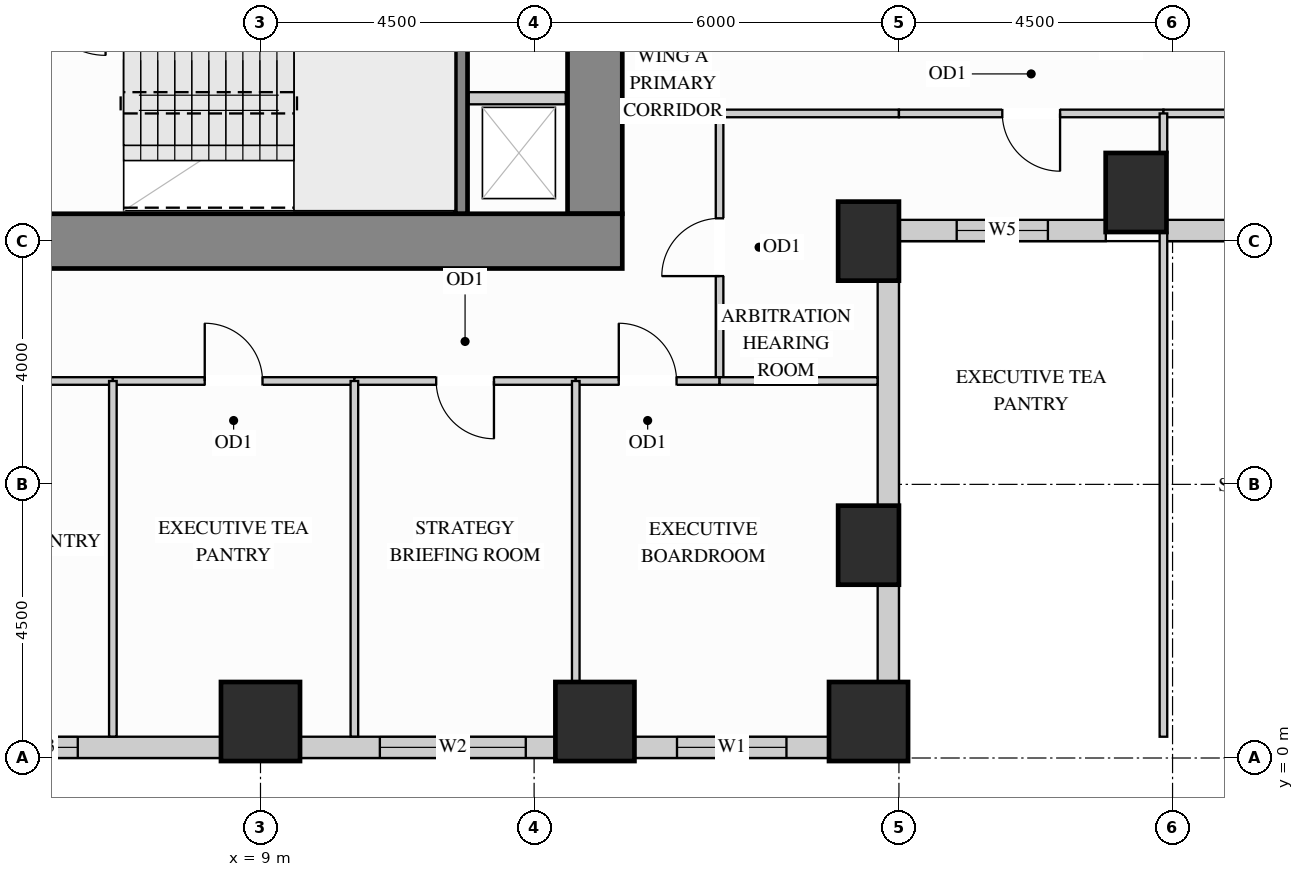
"""IFC4 building model, lengths in metres.
Left out: names, types, materials, properties, quantities, classifications, styles, units other than length and angle.
Written with IfcOpenShell. Run it as: python <this file> out.ifc"""

import sys

from ifc_helpers import new_model, si_unit, direction, frame, frame_2d, origin, origin_2d, place, context, subcontext, project, spatial, rectangle, extrude, source, transform, mapped, element, fill, save


model = new_model("IFC4")
c1 = context("Model", 3, precision=1e-05, world=origin(), true_north=direction((0.0, 1.0)))
c2 = subcontext(c1, "Body", "Model", "MODEL_VIEW")
j1 = project(units=[si_unit("LENGTHUNIT", "METRE"), si_unit("PLANEANGLEUNIT", "RADIAN")], contexts=[c1])
p1 = place(None, origin())
s1 = spatial("IfcSite", under=j1, at=p1, CompositionType="ELEMENT")
p2 = place(p1, origin())
s2 = spatial("IfcBuilding", under=s1, at=p2, CompositionType="ELEMENT")
p3 = place(p2, frame((0.0, 0.0, 51.3)))
s3 = spatial("IfcBuildingStorey", under=s2, at=p3, CompositionType="ELEMENT", Elevation=51.3)
m1 = source(origin(), c2, "Body", "SweptSolid", [
    extrude(rectangle(XDim=1.0, YDim=1.3, at=origin_2d()), origin(), (0.0, 0.0, 1.0), 3.38),
])
for number, where, z_axis, x_axis in (
    (1, (19.0, 3.5, 0.0), (0.0, 0.0, 1.0), (1.0, 0.0, 0.0)),
    (2, (19.0, 8.5, 0.0), (0.0, 0.0, 1.0), (1.0, 0.0, 0.0)),
    (3, (23.4, 9.3, 0.0), (0.0, 0.0, 1.0), (1.0, 0.0, 0.0)),
):
    element("IfcColumn", number, at=place(p3, frame(where, z_axis=z_axis, x_axis=x_axis)), inside=s3, PredefinedType="COLUMN", context=c2, shape_type="MappedRepresentation", body=[
        mapped(m1, transform((0.0, 0.0, 0.0), x_axis=(1.0, 0.0, 0.0), y_axis=(0.0, 1.0, 0.0), z_axis=(0.0, 0.0, 1.0))),
    ])
m2 = source(origin(), c2, "Body", "SweptSolid", [
    extrude(rectangle(XDim=1.3, YDim=1.3, at=origin_2d()), origin(), (0.0, 0.0, 1.0), 3.38),
])
for number, where, z_axis, x_axis in (
    (4, (14.5, 0.6, 0.0), (0.0, 0.0, 1.0), (1.0, 0.0, 0.0)),
    (5, (19.0, 0.6, 0.0), (0.0, 0.0, 1.0), (1.0, 0.0, 0.0)),
    (6, (9.0, 0.6, 0.0), (0.0, 0.0, 1.0), (1.0, 0.0, 0.0)),
):
    element("IfcColumn", number, at=place(p3, frame(where, z_axis=z_axis, x_axis=x_axis)), inside=s3, PredefinedType="COLUMN", context=c2, shape_type="MappedRepresentation", body=[
        mapped(m2, transform((0.0, 0.0, 0.0), x_axis=(1.0, 0.0, 0.0), y_axis=(0.0, 1.0, 0.0), z_axis=(0.0, 0.0, 1.0))),
    ])
m3 = source(origin(), c2, "Body", "SweptSolid", [
    extrude(rectangle(XDim=9.87, YDim=0.9, at=frame_2d((4.935, 0.0))), origin(), (0.0, 0.0, 1.0), 3.38),
])
p4 = place(p3, frame((14.5, 8.95, 0.0), z_axis=(0.0, 0.0, 1.0), x_axis=(0.0, 1.0, 0.0)))
e7 = element("IfcWall", 7, at=p4, inside=s3, PredefinedType="SHEAR", context=c2, shape_type="MappedRepresentation", body=[
    mapped(m3, transform((0.0, 0.0, 0.0), x_axis=(1.0, 0.0, 0.0), y_axis=(0.0, 1.0, 0.0), z_axis=(0.0, 0.0, 1.0))),
])
m4 = source(origin(), c2, "Body", "SweptSolid", [
    extrude(rectangle(XDim=10.9, YDim=0.9, at=frame_2d((5.45, 0.0))), origin(), (0.0, 0.0, 1.0), 3.38),
])
p5 = place(p3, frame((4.05, 8.5, 0.0), z_axis=(0.0, 0.0, 1.0), x_axis=(1.0, 0.0, 0.0)))
e8 = element("IfcWall", 8, at=p5, inside=s3, PredefinedType="SHEAR", context=c2, shape_type="MappedRepresentation", body=[
    mapped(m4, transform((0.0, 0.0, 0.0), x_axis=(1.0, 0.0, 0.0), y_axis=(0.0, 1.0, 0.0), z_axis=(0.0, 0.0, 1.0))),
])
p6 = place(p3, frame((4.148, 0.175, 0.0), z_axis=(0.0, 0.0, 1.0), x_axis=(1.0, 0.0, 0.0)))
e9 = element("IfcWall", 9, at=p6, inside=s3, PredefinedType="SOLIDWALL", context=c2, shape_type="SweptSolid", body=[
    extrude(rectangle(XDim=4.204, YDim=0.35, at=frame_2d((2.102, 0.0))), origin(), (0.0, 0.0, 1.0), 2.51),
])
p7 = place(p6, frame((0.647, 0.0, 0.78)))
e10 = element("IfcOpeningElement", 10, at=p7, cuts=e9, PredefinedType="OPENING", context=c2, shape_type="SweptSolid", body=[
    extrude(rectangle(XDim=1.2, YDim=1.55, at=frame_2d((0.6, 0.775))), frame((0.0, 0.185, 0.0), z_axis=(0.0, -1.0, 0.0), x_axis=(1.0, 0.0, 0.0)), (0.0, 0.0, 1.0), 0.37),
])
p8 = place(p3, frame((9.648, 0.175, 0.0), z_axis=(0.0, 0.0, 1.0), x_axis=(1.0, 0.0, 0.0)))
e11 = element("IfcWall", 11, at=p8, inside=s3, PredefinedType="SOLIDWALL", context=c2, shape_type="SweptSolid", body=[
    extrude(rectangle(XDim=4.204, YDim=0.35, at=frame_2d((2.102, 0.0))), origin(), (0.0, 0.0, 1.0), 2.51),
])
p9 = place(p8, frame((1.315, 0.0, 0.78)))
e12 = element("IfcOpeningElement", 12, at=p9, cuts=e11, PredefinedType="OPENING", context=c2, shape_type="SweptSolid", body=[
    extrude(rectangle(XDim=2.4, YDim=1.55, at=frame_2d((1.2, 0.775))), frame((0.0, 0.185, 0.0), z_axis=(0.0, -1.0, 0.0), x_axis=(1.0, 0.0, 0.0)), (0.0, 0.0, 1.0), 0.37),
])
p10 = place(p3, frame((15.148, 0.175, 0.0), z_axis=(0.0, 0.0, 1.0), x_axis=(1.0, 0.0, 0.0)))
e13 = element("IfcWall", 13, at=p10, inside=s3, PredefinedType="SOLIDWALL", context=c2, shape_type="SweptSolid", body=[
    extrude(rectangle(XDim=3.204, YDim=0.35, at=frame_2d((1.602, 0.0))), origin(), (0.0, 0.0, 1.0), 2.51),
])
p11 = place(p10, frame((0.702, 0.0, 0.78)))
e14 = element("IfcOpeningElement", 14, at=p11, cuts=e13, PredefinedType="OPENING", context=c2, shape_type="SweptSolid", body=[
    extrude(rectangle(XDim=1.8, YDim=1.55, at=frame_2d((0.9, 0.775))), frame((0.0, 0.185, 0.0), z_axis=(0.0, -1.0, 0.0), x_axis=(1.0, 0.0, 0.0)), (0.0, 0.0, 1.0), 0.37),
])
m5 = source(origin(), c2, "Body", "SweptSolid", [
    extrude(rectangle(XDim=1.604, YDim=0.35, at=frame_2d((0.802, 0.0))), origin(), (0.0, 0.0, 1.0), 2.51),
])
p12 = place(p3, frame((19.325, 1.248, 0.0), z_axis=(0.0, 0.0, 1.0), x_axis=(0.0, 1.0, 0.0)))
e15 = element("IfcWall", 15, at=p12, inside=s3, PredefinedType="SOLIDWALL", context=c2, shape_type="MappedRepresentation", body=[
    mapped(m5, transform((0.0, 0.0, 0.0), x_axis=(1.0, 0.0, 0.0), y_axis=(0.0, 1.0, 0.0), z_axis=(0.0, 0.0, 1.0))),
])
m6 = source(origin(), c2, "Body", "SweptSolid", [
    extrude(rectangle(XDim=3.704, YDim=0.35, at=frame_2d((1.852, 0.0))), origin(), (0.0, 0.0, 1.0), 2.51),
])
p13 = place(p3, frame((19.325, 4.148, 0.0), z_axis=(0.0, 0.0, 1.0), x_axis=(0.0, 1.0, 0.0)))
e16 = element("IfcWall", 16, at=p13, inside=s3, PredefinedType="SOLIDWALL", context=c2, shape_type="MappedRepresentation", body=[
    mapped(m6, transform((0.0, 0.0, 0.0), x_axis=(1.0, 0.0, 0.0), y_axis=(0.0, 1.0, 0.0), z_axis=(0.0, 0.0, 1.0))),
])
p14 = place(p3, frame((19.498, 8.675, 0.0), z_axis=(0.0, 0.0, 1.0), x_axis=(1.0, 0.0, 0.0)))
e17 = element("IfcWall", 17, at=p14, inside=s3, PredefinedType="SOLIDWALL", context=c2, shape_type="SweptSolid", body=[
    extrude(rectangle(XDim=3.404, YDim=0.35, at=frame_2d((1.702, 0.0))), origin(), (0.0, 0.0, 1.0), 3.365),
])
p15 = place(p14, frame((0.952, 0.0, 0.78)))
e18 = element("IfcOpeningElement", 18, at=p15, cuts=e17, PredefinedType="OPENING", context=c2, shape_type="SweptSolid", body=[
    extrude(rectangle(XDim=1.5, YDim=2.0, at=frame_2d((0.75, 1.0))), frame((0.0, 0.185, 0.0), z_axis=(0.0, -1.0, 0.0), x_axis=(1.0, 0.0, 0.0)), (0.0, 0.0, 1.0), 0.37),
])
p16 = place(p3, frame((23.898, 8.675, 0.0), z_axis=(0.0, 0.0, 1.0), x_axis=(1.0, 0.0, 0.0)))
e19 = element("IfcWall", 19, at=p16, inside=s3, PredefinedType="SOLIDWALL", context=c2, shape_type="SweptSolid", body=[
    extrude(rectangle(XDim=6.104, YDim=0.35, at=frame_2d((3.052, 0.0))), origin(), (0.0, 0.0, 1.0), 3.365),
])
p17 = place(p16, frame((1.114, 0.0, 0.78)))
e20 = element("IfcOpeningElement", 20, at=p17, cuts=e19, PredefinedType="OPENING", context=c2, shape_type="SweptSolid", body=[
    extrude(rectangle(XDim=1.5, YDim=2.0, at=frame_2d((0.75, 1.0))), frame((0.0, 0.185, 0.0), z_axis=(0.0, -1.0, 0.0), x_axis=(1.0, 0.0, 0.0)), (0.0, 0.0, 1.0), 0.37),
])
p18 = place(p16, frame((3.408, 0.0, 0.78)))
e21 = element("IfcOpeningElement", 21, at=p18, cuts=e19, PredefinedType="OPENING", context=c2, shape_type="SweptSolid", body=[
    extrude(rectangle(XDim=1.5, YDim=2.0, at=frame_2d((0.75, 1.0))), frame((0.0, 0.185, 0.0), z_axis=(0.0, -1.0, 0.0), x_axis=(1.0, 0.0, 0.0)), (0.0, 0.0, 1.0), 0.37),
])
p19 = place(p3, frame((16.55, 6.2, 0.0), z_axis=(0.0, 0.0, 1.0), x_axis=(0.0, 1.0, 0.0)))
e22 = element("IfcWall", 22, at=p19, inside=s3, PredefinedType="PARTITIONING", context=c2, shape_type="SweptSolid", body=[
    extrude(rectangle(XDim=4.4, YDim=0.125, at=frame_2d((2.2, 0.0))), origin(), (0.0, 0.0, 1.0), 3.365),
])
p20 = place(p19, frame((1.725, 0.0, 0.0)))
e23 = element("IfcOpeningElement", 23, at=p20, cuts=e22, PredefinedType="OPENING", context=c2, shape_type="SweptSolid", body=[
    extrude(rectangle(XDim=0.95, YDim=2.15, at=frame_2d((0.475, 1.075))), frame((0.0, 0.073, 0.0), z_axis=(0.0, -1.0, 0.0), x_axis=(1.0, 0.0, 0.0)), (0.0, 0.0, 1.0), 0.145),
])
m7 = source(origin(), c2, "Body", "SweptSolid", [
    extrude(rectangle(XDim=2.95, YDim=0.125, at=frame_2d((1.475, 0.0))), origin(), (0.0, 0.0, 1.0), 3.365),
])
p21 = place(p3, frame((16.55, 10.6, 0.0), z_axis=(0.0, 0.0, 1.0), x_axis=(1.0, 0.0, 0.0)))
e24 = element("IfcWall", 24, at=p21, inside=s3, PredefinedType="PARTITIONING", context=c2, shape_type="MappedRepresentation", body=[
    mapped(m7, transform((0.0, 0.0, 0.0), x_axis=(1.0, 0.0, 0.0), y_axis=(0.0, 1.0, 0.0), z_axis=(0.0, 0.0, 1.0))),
])
p22 = place(p3, frame((19.5, 10.6, 0.0), z_axis=(0.0, 0.0, 1.0), x_axis=(1.0, 0.0, 0.0)))
e25 = element("IfcWall", 25, at=p22, inside=s3, PredefinedType="PARTITIONING", context=c2, shape_type="SweptSolid", body=[
    extrude(rectangle(XDim=4.35, YDim=0.125, at=frame_2d((2.175, 0.0))), origin(), (0.0, 0.0, 1.0), 3.365),
])
p23 = place(p22, frame((1.7, 0.0, 0.0)))
e26 = element("IfcOpeningElement", 26, at=p23, cuts=e25, PredefinedType="OPENING", context=c2, shape_type="SweptSolid", body=[
    extrude(rectangle(XDim=0.95, YDim=2.15, at=frame_2d((0.475, 1.075))), frame((0.0, 0.073, 0.0), z_axis=(0.0, -1.0, 0.0), x_axis=(1.0, 0.0, 0.0)), (0.0, 0.0, 1.0), 0.145),
])
p24 = place(p3, frame((23.85, 10.6, 0.0), z_axis=(0.0, 0.0, 1.0), x_axis=(1.0, 0.0, 0.0)))
e27 = element("IfcWall", 27, at=p24, inside=s3, PredefinedType="PARTITIONING", context=c2, shape_type="SweptSolid", body=[
    extrude(rectangle(XDim=6.0, YDim=0.125, at=frame_2d((3.0, 0.0))), origin(), (0.0, 0.0, 1.0), 3.365),
])
p25 = place(p24, frame((2.525, 0.0, 0.0)))
e28 = element("IfcOpeningElement", 28, at=p25, cuts=e27, PredefinedType="OPENING", context=c2, shape_type="SweptSolid", body=[
    extrude(rectangle(XDim=0.95, YDim=2.15, at=frame_2d((0.475, 1.075))), frame((0.0, 0.073, 0.0), z_axis=(0.0, -1.0, 0.0), x_axis=(1.0, 0.0, 0.0)), (0.0, 0.0, 1.0), 0.145),
])
m8 = source(origin(), c2, "Body", "SweptSolid", [
    extrude(rectangle(XDim=8.29, YDim=0.125, at=frame_2d((4.145, 0.0))), origin(), (0.0, 0.0, 1.0), 3.365),
])
p26 = place(p3, frame((23.85, 0.35, 0.0), z_axis=(0.0, 0.0, 1.0), x_axis=(0.0, 1.0, 0.0)))
e29 = element("IfcWall", 29, at=p26, inside=s3, PredefinedType="PARTITIONING", context=c2, shape_type="MappedRepresentation", body=[
    mapped(m8, transform((0.0, 0.0, 0.0), x_axis=(1.0, 0.0, 0.0), y_axis=(0.0, 1.0, 0.0), z_axis=(0.0, 0.0, 1.0))),
])
m9 = source(origin(), c2, "Body", "SweptSolid", [
    extrude(rectangle(XDim=0.64, YDim=0.125, at=frame_2d((0.32, 0.0))), origin(), (0.0, 0.0, 1.0), 3.365),
])
p27 = place(p3, frame((23.85, 9.96, 0.0), z_axis=(0.0, 0.0, 1.0), x_axis=(0.0, 1.0, 0.0)))
e30 = element("IfcWall", 30, at=p27, inside=s3, PredefinedType="PARTITIONING", context=c2, shape_type="MappedRepresentation", body=[
    mapped(m9, transform((0.0, 0.0, 0.0), x_axis=(1.0, 0.0, 0.0), y_axis=(0.0, 1.0, 0.0), z_axis=(0.0, 0.0, 1.0))),
])
p28 = place(p3, frame((2.45, 6.2, 0.0), z_axis=(0.0, 0.0, 1.0), x_axis=(1.0, 0.0, 0.0)))
e31 = element("IfcWall", 31, at=p28, inside=s3, PredefinedType="PARTITIONING", context=c2, shape_type="SweptSolid", body=[
    extrude(rectangle(XDim=4.122, YDim=0.125, at=frame_2d((2.061, 0.0))), origin(), (0.0, 0.0, 1.0), 2.828),
])
p29 = place(p28, frame((1.586, 0.0, 0.0)))
e32 = element("IfcOpeningElement", 32, at=p29, cuts=e31, PredefinedType="OPENING", context=c2, shape_type="SweptSolid", body=[
    extrude(rectangle(XDim=0.95, YDim=2.15, at=frame_2d((0.475, 1.075))), frame((0.0, 0.073, 0.0), z_axis=(0.0, -1.0, 0.0), x_axis=(1.0, 0.0, 0.0)), (0.0, 0.0, 1.0), 0.145),
])
p30 = place(p3, frame((6.572, 6.2, 0.0), z_axis=(0.0, 0.0, 1.0), x_axis=(1.0, 0.0, 0.0)))
e33 = element("IfcWall", 33, at=p30, inside=s3, PredefinedType="PARTITIONING", context=c2, shape_type="SweptSolid", body=[
    extrude(rectangle(XDim=3.972, YDim=0.125, at=frame_2d((1.986, 0.0))), origin(), (0.0, 0.0, 1.0), 2.828),
])
p31 = place(p30, frame((1.511, 0.0, 0.0)))
e34 = element("IfcOpeningElement", 34, at=p31, cuts=e33, PredefinedType="OPENING", context=c2, shape_type="SweptSolid", body=[
    extrude(rectangle(XDim=0.95, YDim=2.15, at=frame_2d((0.475, 1.075))), frame((0.0, 0.073, 0.0), z_axis=(0.0, -1.0, 0.0), x_axis=(1.0, 0.0, 0.0)), (0.0, 0.0, 1.0), 0.145),
])
p32 = place(p3, frame((10.544, 6.2, 0.0), z_axis=(0.0, 0.0, 1.0), x_axis=(1.0, 0.0, 0.0)))
e35 = element("IfcWall", 35, at=p32, inside=s3, PredefinedType="PARTITIONING", context=c2, shape_type="SweptSolid", body=[
    extrude(rectangle(XDim=3.641, YDim=0.125, at=frame_2d((1.821, 0.0))), origin(), (0.0, 0.0, 1.0), 2.828),
])
p33 = place(p32, frame((1.345, 0.0, 0.0)))
e36 = element("IfcOpeningElement", 36, at=p33, cuts=e35, PredefinedType="OPENING", context=c2, shape_type="SweptSolid", body=[
    extrude(rectangle(XDim=0.95, YDim=2.15, at=frame_2d((0.475, 1.075))), frame((0.0, 0.073, 0.0), z_axis=(0.0, -1.0, 0.0), x_axis=(1.0, 0.0, 0.0)), (0.0, 0.0, 1.0), 0.145),
])
p34 = place(p3, frame((14.185, 6.2, 0.0), z_axis=(0.0, 0.0, 1.0), x_axis=(1.0, 0.0, 0.0)))
e37 = element("IfcWall", 37, at=p34, inside=s3, PredefinedType="PARTITIONING", context=c2, shape_type="SweptSolid", body=[
    extrude(rectangle(XDim=2.365, YDim=0.125, at=frame_2d((1.183, 0.0))), origin(), (0.0, 0.0, 1.0), 2.828),
])
p35 = place(p34, frame((0.708, 0.0, 0.0)))
e38 = element("IfcOpeningElement", 38, at=p35, cuts=e37, PredefinedType="OPENING", context=c2, shape_type="SweptSolid", body=[
    extrude(rectangle(XDim=0.95, YDim=2.15, at=frame_2d((0.475, 1.075))), frame((0.0, 0.073, 0.0), z_axis=(0.0, -1.0, 0.0), x_axis=(1.0, 0.0, 0.0)), (0.0, 0.0, 1.0), 0.145),
])
m10 = source(origin(), c2, "Body", "SweptSolid", [
    extrude(rectangle(XDim=2.598, YDim=0.125, at=frame_2d((1.299, 0.0))), origin(), (0.0, 0.0, 1.0), 2.828),
])
p36 = place(p3, frame((16.55, 6.2, 0.0), z_axis=(0.0, 0.0, 1.0), x_axis=(1.0, 0.0, 0.0)))
e39 = element("IfcWall", 39, at=p36, inside=s3, PredefinedType="PARTITIONING", context=c2, shape_type="MappedRepresentation", body=[
    mapped(m10, transform((0.0, 0.0, 0.0), x_axis=(1.0, 0.0, 0.0), y_axis=(0.0, 1.0, 0.0), z_axis=(0.0, 0.0, 1.0))),
])
m11 = source(origin(), c2, "Body", "SweptSolid", [
    extrude(rectangle(XDim=5.848, YDim=0.125, at=frame_2d((2.924, 0.0))), origin(), (0.0, 0.0, 1.0), 3.365),
])
for number, where, z_axis, x_axis in (
    (40, (6.572, 0.352, 0.0), (0.0, 0.0, 1.0), (0.0, 1.0, 0.0)),
    (41, (10.544, 0.352, 0.0), (0.0, 0.0, 1.0), (0.0, 1.0, 0.0)),
):
    element("IfcWall", number, at=place(p3, frame(where, z_axis=z_axis, x_axis=x_axis)), inside=s3, PredefinedType="PARTITIONING", context=c2, shape_type="MappedRepresentation", body=[
        mapped(m11, transform((0.0, 0.0, 0.0), x_axis=(1.0, 0.0, 0.0), y_axis=(0.0, 1.0, 0.0), z_axis=(0.0, 0.0, 1.0))),
    ])
m12 = source(origin(), c2, "Body", "SweptSolid", [
    extrude(rectangle(XDim=4.94, YDim=0.125, at=frame_2d((2.47, 0.0))), origin(), (0.0, 0.0, 1.0), 3.365),
])
p37 = place(p3, frame((14.185, 1.26, 0.0), z_axis=(0.0, 0.0, 1.0), x_axis=(0.0, 1.0, 0.0)))
e42 = element("IfcWall", 42, at=p37, inside=s3, PredefinedType="PARTITIONING", context=c2, shape_type="MappedRepresentation", body=[
    mapped(m12, transform((0.0, 0.0, 0.0), x_axis=(1.0, 0.0, 0.0), y_axis=(0.0, 1.0, 0.0), z_axis=(0.0, 0.0, 1.0))),
])
m13 = source(origin(), c2, "Body", "SweptSolid", [
    extrude(rectangle(XDim=1.6, YDim=0.2, at=frame_2d((0.8, 0.0))), origin(), (0.0, 0.0, 1.0), 3.365),
])
p38 = place(p3, frame((12.42, 10.85, 0.0), z_axis=(0.0, 0.0, 1.0), x_axis=(1.0, 0.0, 0.0)))
e43 = element("IfcWall", 43, at=p38, inside=s3, PredefinedType="PARTITIONING", context=c2, shape_type="MappedRepresentation", body=[
    mapped(m13, transform((0.0, 0.0, 0.0), x_axis=(1.0, 0.0, 0.0), y_axis=(0.0, 1.0, 0.0), z_axis=(0.0, 0.0, 1.0))),
])
m14 = source(origin(), c2, "Body", "SweptSolid", [
    extrude(rectangle(XDim=3.603, YDim=0.2, at=frame_2d((1.802, 0.0))), origin(), (0.0, 0.0, 1.0), 3.38),
])
p39 = place(p3, frame((12.305, 8.952, 0.0), z_axis=(0.0, 0.0, 1.0), x_axis=(0.0, 1.0, 0.0)))
e44 = element("IfcWall", 44, at=p39, inside=s3, PredefinedType="SHEAR", context=c2, shape_type="MappedRepresentation", body=[
    mapped(m14, transform((0.0, 0.0, 0.0), x_axis=(1.0, 0.0, 0.0), y_axis=(0.0, 1.0, 0.0), z_axis=(0.0, 0.0, 1.0))),
])
m15 = source(origin(), c2, "Body", "SweptSolid", [
    extrude(rectangle(XDim=0.95, YDim=2.15, at=frame_2d((0.475, 1.075))), frame((0.0, 0.025, 0.0), z_axis=(0.0, -1.0, 0.0), x_axis=(1.0, 0.0, 0.0)), (0.0, 0.0, 1.0), 0.05),
])
p40 = place(p20, origin())
e45 = element("IfcDoor", 45, at=p40, inside=s3, OperationType="SINGLE_SWING_LEFT", PredefinedType="DOOR", context=c2, shape_type="MappedRepresentation", body=[
    mapped(m15, transform((0.0, 0.0, 0.0), x_axis=(1.0, 0.0, 0.0), y_axis=(0.0, 1.0, 0.0), z_axis=(0.0, 0.0, 1.0))),
])
fill(e23, e45)
p41 = place(p31, origin())
e46 = element("IfcDoor", 46, at=p41, inside=s3, OperationType="SINGLE_SWING_LEFT", PredefinedType="DOOR", context=c2, shape_type="MappedRepresentation", body=[
    mapped(m15, transform((0.0, 0.0, 0.0), x_axis=(1.0, 0.0, 0.0), y_axis=(0.0, 1.0, 0.0), z_axis=(0.0, 0.0, 1.0))),
])
fill(e34, e46)
p42 = place(p33, origin())
e47 = element("IfcDoor", 47, at=p42, inside=s3, OperationType="SINGLE_SWING_RIGHT", PredefinedType="DOOR", context=c2, shape_type="MappedRepresentation", body=[
    mapped(m15, transform((0.0, 0.0, 0.0), x_axis=(1.0, 0.0, 0.0), y_axis=(0.0, 1.0, 0.0), z_axis=(0.0, 0.0, 1.0))),
])
fill(e36, e47)
p43 = place(p35, origin())
e48 = element("IfcDoor", 48, at=p43, inside=s3, OperationType="SINGLE_SWING_LEFT", PredefinedType="DOOR", context=c2, shape_type="MappedRepresentation", body=[
    mapped(m15, transform((0.0, 0.0, 0.0), x_axis=(1.0, 0.0, 0.0), y_axis=(0.0, 1.0, 0.0), z_axis=(0.0, 0.0, 1.0))),
])
fill(e38, e48)
p44 = place(p23, origin())
e49 = element("IfcDoor", 49, at=p44, inside=s3, OperationType="SINGLE_SWING_RIGHT", PredefinedType="DOOR", context=c2, shape_type="MappedRepresentation", body=[
    mapped(m15, transform((0.0, 0.0, 0.0), x_axis=(1.0, 0.0, 0.0), y_axis=(0.0, 1.0, 0.0), z_axis=(0.0, 0.0, 1.0))),
])
fill(e26, e49)
m16 = source(origin(), c2, "Body", "SweptSolid", [
    extrude(rectangle(XDim=1.8, YDim=1.55, at=frame_2d((0.9, 0.775))), frame((0.0, 0.03, 0.0), z_axis=(0.0, -1.0, 0.0), x_axis=(1.0, 0.0, 0.0)), (0.0, 0.0, 1.0), 0.06),
])
p45 = place(p11, origin())
e50 = element("IfcWindow", 50, at=p45, inside=s3, PartitioningType="SINGLE_PANEL", PredefinedType="WINDOW", context=c2, shape_type="MappedRepresentation", body=[
    mapped(m16, transform((0.0, 0.0, 0.0), x_axis=(1.0, 0.0, 0.0), y_axis=(0.0, 1.0, 0.0), z_axis=(0.0, 0.0, 1.0))),
])
fill(e14, e50)
m17 = source(origin(), c2, "Body", "SweptSolid", [
    extrude(rectangle(XDim=2.4, YDim=1.55, at=frame_2d((1.2, 0.775))), frame((0.0, 0.03, 0.0), z_axis=(0.0, -1.0, 0.0), x_axis=(1.0, 0.0, 0.0)), (0.0, 0.0, 1.0), 0.06),
])
p46 = place(p9, origin())
e51 = element("IfcWindow", 51, at=p46, inside=s3, PartitioningType="SINGLE_PANEL", PredefinedType="WINDOW", context=c2, shape_type="MappedRepresentation", body=[
    mapped(m17, transform((0.0, 0.0, 0.0), x_axis=(1.0, 0.0, 0.0), y_axis=(0.0, 1.0, 0.0), z_axis=(0.0, 0.0, 1.0))),
])
fill(e12, e51)
m18 = source(origin(), c2, "Body", "SweptSolid", [
    extrude(rectangle(XDim=1.2, YDim=1.55, at=frame_2d((0.6, 0.775))), frame((0.0, 0.03, 0.0), z_axis=(0.0, -1.0, 0.0), x_axis=(1.0, 0.0, 0.0)), (0.0, 0.0, 1.0), 0.06),
])
p47 = place(p7, origin())
e52 = element("IfcWindow", 52, at=p47, inside=s3, PartitioningType="SINGLE_PANEL", PredefinedType="WINDOW", context=c2, shape_type="MappedRepresentation", body=[
    mapped(m18, transform((0.0, 0.0, 0.0), x_axis=(1.0, 0.0, 0.0), y_axis=(0.0, 1.0, 0.0), z_axis=(0.0, 0.0, 1.0))),
])
fill(e10, e52)
m19 = source(origin(), c2, "Body", "SweptSolid", [
    extrude(rectangle(XDim=1.5, YDim=2.0, at=frame_2d((0.75, 1.0))), frame((0.0, 0.03, 0.0), z_axis=(0.0, -1.0, 0.0), x_axis=(1.0, 0.0, 0.0)), (0.0, 0.0, 1.0), 0.06),
])
p48 = place(p15, origin())
e53 = element("IfcWindow", 53, at=p48, inside=s3, PartitioningType="SINGLE_PANEL", PredefinedType="WINDOW", context=c2, shape_type="MappedRepresentation", body=[
    mapped(m19, transform((0.0, 0.0, 0.0), x_axis=(1.0, 0.0, 0.0), y_axis=(0.0, 1.0, 0.0), z_axis=(0.0, 0.0, 1.0))),
])
fill(e18, e53)
save(model, sys.argv[1])
